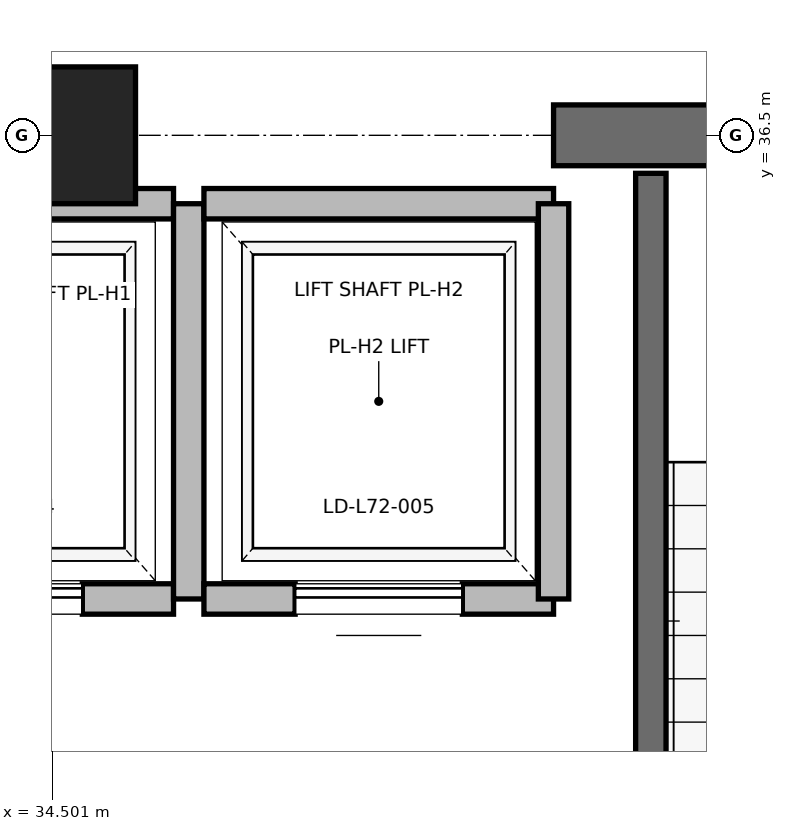
"""IFC4 building model, lengths in metres.
Left out: names, types, materials, properties, quantities, classifications, styles, units other than length and angle.
Written with IfcOpenShell. Run it as: python <this file> out.ifc"""

import sys

from ifc_helpers import new_model, si_unit, direction, frame, frame_2d, origin, origin_2d, place, context, subcontext, project, spatial, rectangle, extrude, element, fill, save


model = new_model("IFC4")
c1 = context("Model", 3, precision=1e-05, world=origin(), true_north=direction((0.0, 1.0)))
c2 = subcontext(c1, "Body", "Model", "MODEL_VIEW")
j1 = project(units=[si_unit("LENGTHUNIT", "METRE"), si_unit("PLANEANGLEUNIT", "RADIAN")], contexts=[c1])
p1 = place(None, origin())
s1 = spatial("IfcSite", under=j1, at=p1, CompositionType="ELEMENT")
p2 = place(p1, origin())
s2 = spatial("IfcBuilding", under=s1, at=p2, CompositionType="ELEMENT")
p3 = place(p2, frame((0.0, 0.0, 310.8)))
s3 = spatial("IfcBuildingStorey", under=s2, at=p3, CompositionType="ELEMENT", Elevation=310.8)
p4 = place(p3, frame((34.6, 36.5, 0.0), z_axis=(0.0, 0.0, 1.0), x_axis=(1.0, 0.0, 0.0)))
e1 = element("IfcColumn", 1, at=p4, inside=s3, PredefinedType="PILASTER", context=c2, shape_type="SweptSolid", body=[
    extrude(rectangle(XDim=0.9, YDim=0.9, at=origin_2d()), origin(), (0.0, 0.0, 1.0), 4.0),
])
p5 = place(p3, frame((29.0, 36.5, 0.0), z_axis=(0.0, 0.0, 1.0), x_axis=(1.0, 0.0, 0.0)))
e2 = element("IfcWall", 2, at=p5, inside=s3, PredefinedType="SHEAR", context=c2, shape_type="SweptSolid", body=[
    extrude(rectangle(XDim=5.8, YDim=0.4, at=frame_2d((2.9, 0.0))), origin(), (0.0, 0.0, 1.0), 3.785),
])
p6 = place(p3, frame((37.8, 36.5, 0.0), z_axis=(0.0, 0.0, 1.0), x_axis=(1.0, 0.0, 0.0)))
e3 = element("IfcWall", 3, at=p6, inside=s3, PredefinedType="SHEAR", context=c2, shape_type="SweptSolid", body=[
    extrude(rectangle(XDim=4.4, YDim=0.4, at=frame_2d((2.2, 0.0))), origin(), (0.0, 0.0, 1.0), 3.785),
])
p7 = place(p6, frame((1.65, 0.0, 0.0)))
e4 = element("IfcOpeningElement", 4, at=p7, cuts=e3, PredefinedType="OPENING", context=c2, shape_type="SweptSolid", body=[
    extrude(rectangle(XDim=1.1, YDim=2.15, at=frame_2d((0.55, 1.075))), frame((0.0, 0.2, 0.0), z_axis=(0.0, -1.0, 0.0), x_axis=(1.0, 0.0, 0.0)), (0.0, 0.0, 1.0), 0.4),
])
p8 = place(p3, frame((38.44, 27.38, 0.0), z_axis=(0.0, 0.0, 1.0), x_axis=(0.0, 1.0, 0.0)))
e5 = element("IfcWall", 5, at=p8, inside=s3, PredefinedType="SOLIDWALL", context=c2, shape_type="SweptSolid", body=[
    extrude(rectangle(XDim=8.87, YDim=0.2, at=frame_2d((4.435, 0.0))), origin(), (0.0, 0.0, 1.0), 3.785),
])
p9 = place(p3, frame((33.0, 33.45, 0.0), z_axis=(0.0, 0.0, 1.0), x_axis=(1.0, 0.0, 0.0)))
e6 = element("IfcWall", 6, at=p9, inside=s3, PredefinedType="SOLIDWALL", context=c2, shape_type="SweptSolid", body=[
    extrude(rectangle(XDim=2.3, YDim=0.2, at=frame_2d((1.15, 0.0))), origin(), (0.0, 0.0, 1.0), 3.785),
])
p10 = place(p9, frame((0.6, 0.0, 0.0)))
e7 = element("IfcOpeningElement", 7, at=p10, cuts=e6, PredefinedType="OPENING", context=c2, shape_type="SweptSolid", body=[
    extrude(rectangle(XDim=1.1, YDim=2.2, at=frame_2d((0.55, 1.1))), frame((0.0, 0.1, 0.0), z_axis=(0.0, -1.0, 0.0), x_axis=(1.0, 0.0, 0.0)), (0.0, 0.0, 1.0), 0.2),
])
p11 = place(p3, frame((35.3, 36.05, 0.0), z_axis=(0.0, 0.0, 1.0), x_axis=(-1.0, 0.0, 0.0)))
e8 = element("IfcWall", 8, at=p11, inside=s3, PredefinedType="SOLIDWALL", context=c2, shape_type="SweptSolid", body=[
    extrude(rectangle(XDim=2.3, YDim=0.2, at=frame_2d((1.15, 0.0))), origin(), (0.0, 0.0, 1.0), 2.865),
])
p12 = place(p3, frame((35.4, 33.45, 0.0), z_axis=(0.0, 0.0, 1.0), x_axis=(0.0, 1.0, 0.0)))
e9 = element("IfcWall", 9, at=p12, inside=s3, PredefinedType="SOLIDWALL", context=c2, shape_type="SweptSolid", body=[
    extrude(rectangle(XDim=2.6, YDim=0.2, at=frame_2d((1.3, 0.0))), origin(), (0.0, 0.0, 1.0), 2.865),
])
p13 = place(p3, frame((35.5, 33.45, 0.0), z_axis=(0.0, 0.0, 1.0), x_axis=(1.0, 0.0, 0.0)))
e10 = element("IfcWall", 10, at=p13, inside=s3, PredefinedType="SOLIDWALL", context=c2, shape_type="SweptSolid", body=[
    extrude(rectangle(XDim=2.3, YDim=0.2, at=frame_2d((1.15, 0.0))), origin(), (0.0, 0.0, 1.0), 3.785),
])
p14 = place(p13, frame((0.6, 0.0, 0.0)))
e11 = element("IfcOpeningElement", 11, at=p14, cuts=e10, PredefinedType="OPENING", context=c2, shape_type="SweptSolid", body=[
    extrude(rectangle(XDim=1.1, YDim=2.2, at=frame_2d((0.55, 1.1))), frame((0.0, 0.1, 0.0), z_axis=(0.0, -1.0, 0.0), x_axis=(1.0, 0.0, 0.0)), (0.0, 0.0, 1.0), 0.2),
])
p15 = place(p3, frame((37.8, 36.05, 0.0), z_axis=(0.0, 0.0, 1.0), x_axis=(-1.0, 0.0, 0.0)))
e12 = element("IfcWall", 12, at=p15, inside=s3, PredefinedType="SOLIDWALL", context=c2, shape_type="SweptSolid", body=[
    extrude(rectangle(XDim=2.3, YDim=0.2, at=frame_2d((1.15, 0.0))), origin(), (0.0, 0.0, 1.0), 2.865),
])
p16 = place(p3, frame((37.8, 33.45, 0.0), z_axis=(0.0, 0.0, 1.0), x_axis=(0.0, 1.0, 0.0)))
e13 = element("IfcWall", 13, at=p16, inside=s3, PredefinedType="SOLIDWALL", context=c2, shape_type="SweptSolid", body=[
    extrude(rectangle(XDim=2.6, YDim=0.2, at=frame_2d((1.3, 0.0))), origin(), (0.0, 0.0, 1.0), 2.865),
])
p17 = place(p10, origin())
e14 = element("IfcDoor", 14, at=p17, inside=s3, OperationType="SLIDING_TO_RIGHT", PredefinedType="DOOR", context=c2, shape_type="SweptSolid", body=[
    extrude(rectangle(XDim=1.1, YDim=2.2, at=frame_2d((0.55, 1.1))), frame((0.0, 0.025, 0.0), z_axis=(0.0, -1.0, 0.0), x_axis=(1.0, 0.0, 0.0)), (0.0, 0.0, 1.0), 0.05),
])
fill(e7, e14)
p18 = place(p14, origin())
e15 = element("IfcDoor", 15, at=p18, inside=s3, OperationType="SLIDING_TO_RIGHT", PredefinedType="DOOR", context=c2, shape_type="SweptSolid", body=[
    extrude(rectangle(XDim=1.1, YDim=2.2, at=frame_2d((0.55, 1.1))), frame((0.0, 0.025, 0.0), z_axis=(0.0, -1.0, 0.0), x_axis=(1.0, 0.0, 0.0)), (0.0, 0.0, 1.0), 0.05),
])
fill(e11, e15)
save(model, sys.argv[1])
